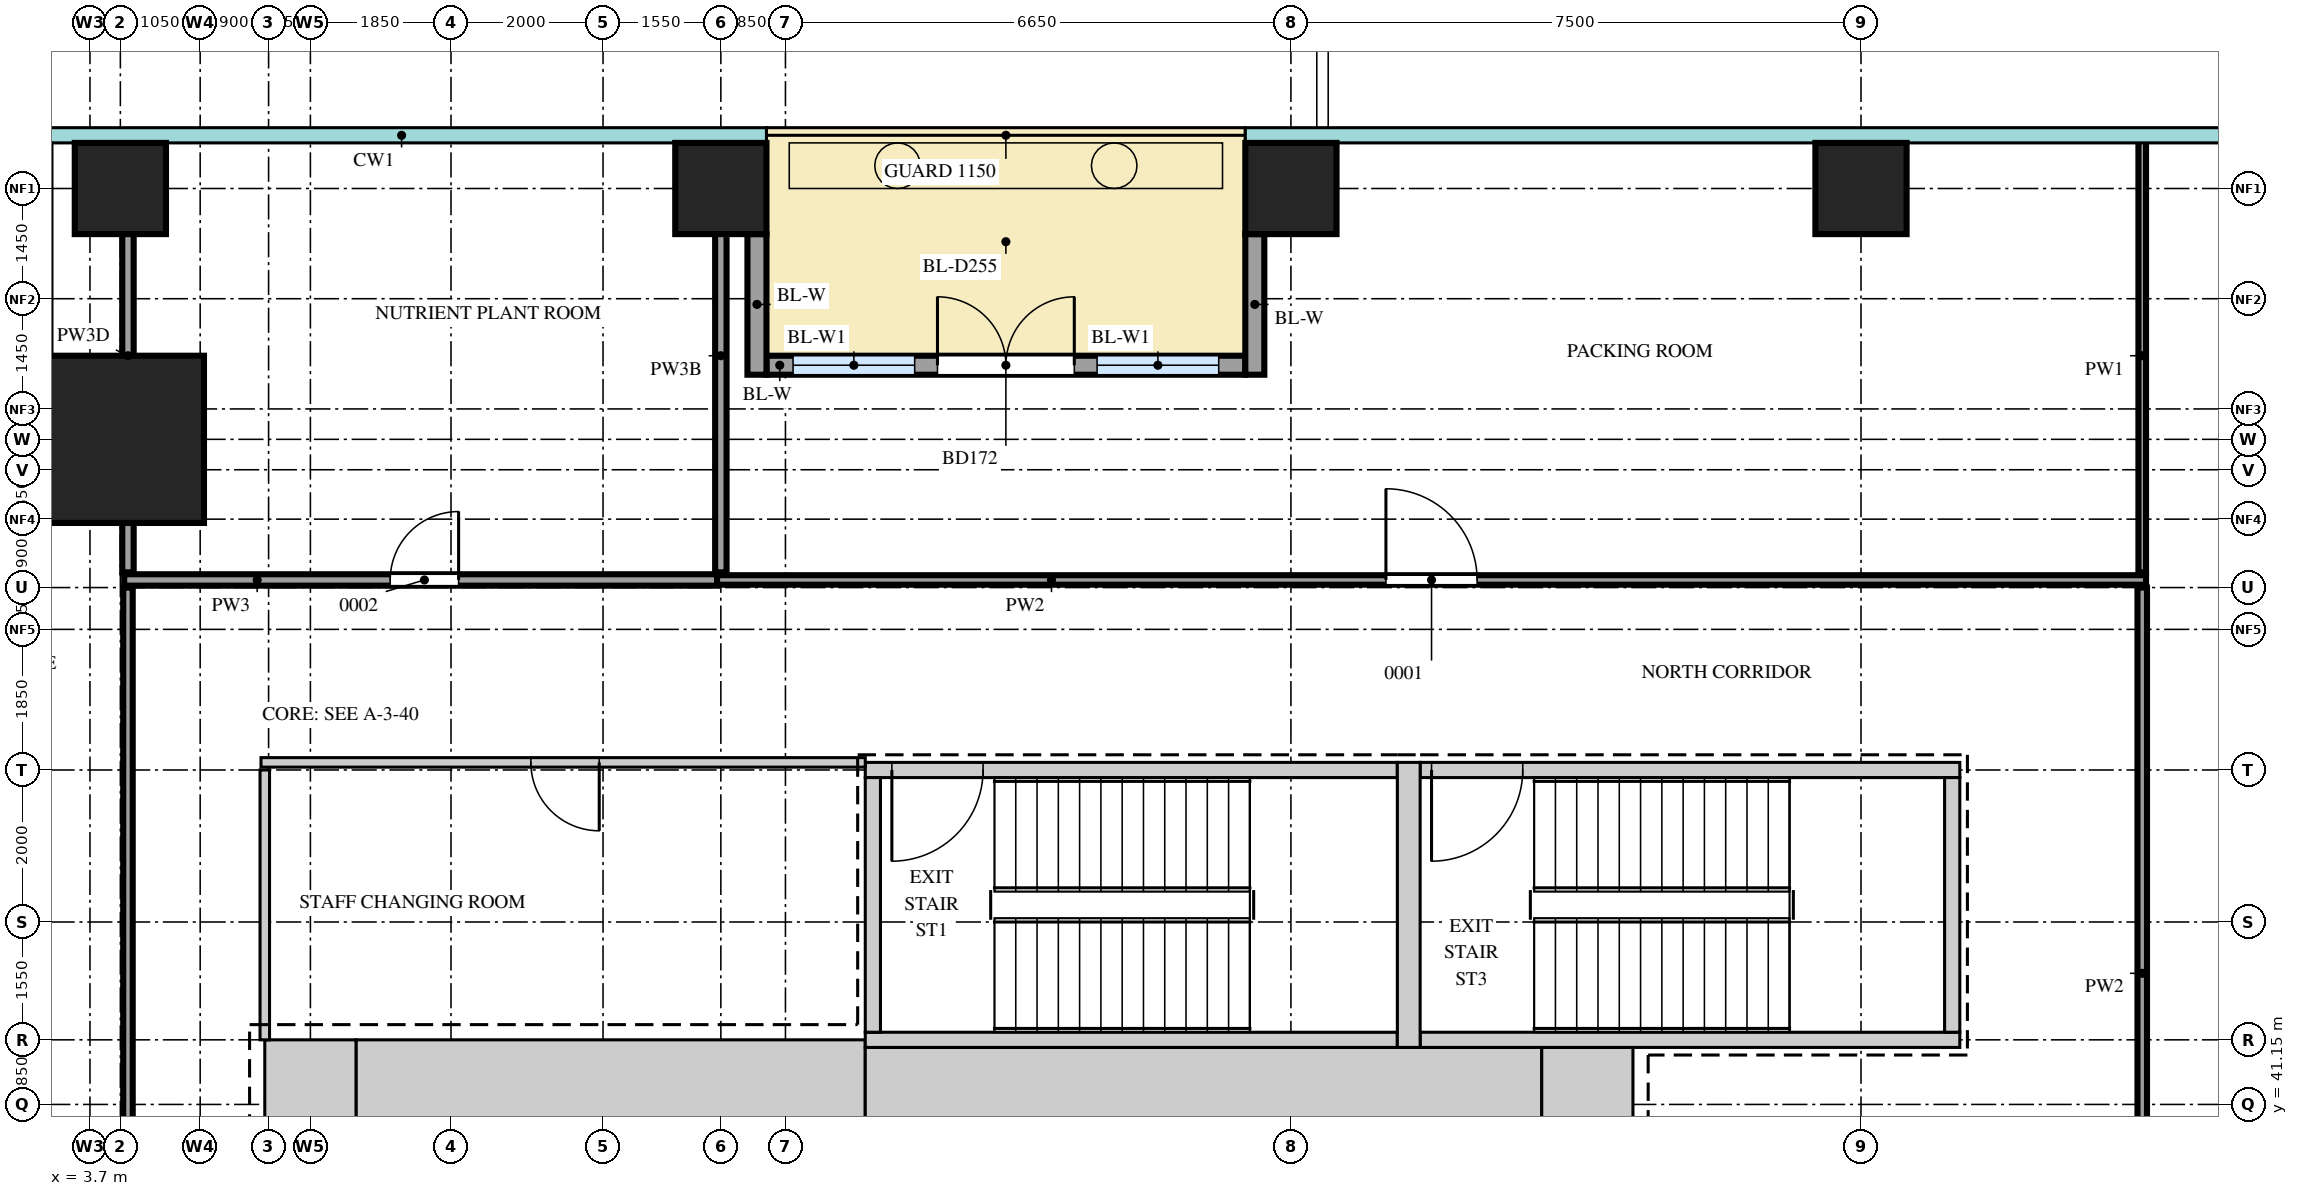
"""IFC4 building model, lengths in metres.
Left out: names, types, materials, properties, quantities, classifications, styles, units other than length and angle.
Written with IfcOpenShell. Run it as: python <this file> out.ifc"""

import sys

from ifc_helpers import new_model, si_unit, direction, frame, frame_2d, origin, origin_2d, place, context, subcontext, project, spatial, rectangle, extrude, source, transform, mapped, element, fill, save


model = new_model("IFC4")
c1 = context("Model", 3, precision=1e-05, world=origin(), true_north=direction((0.0, 1.0)))
c2 = subcontext(c1, "Body", "Model", "MODEL_VIEW")
j1 = project(units=[si_unit("LENGTHUNIT", "METRE"), si_unit("PLANEANGLEUNIT", "RADIAN")], contexts=[c1])
p1 = place(None, origin())
s1 = spatial("IfcSite", under=j1, at=p1, CompositionType="ELEMENT")
p2 = place(p1, origin())
s2 = spatial("IfcBuilding", under=s1, at=p2, CompositionType="ELEMENT")
p3 = place(p2, frame((0.0, 0.0, 82.5)))
s3 = spatial("IfcBuildingStorey", under=s2, at=p3, CompositionType="ELEMENT", Elevation=82.5)
m1 = source(origin(), c2, "Body", "SweptSolid", [
    extrude(rectangle(XDim=6.7, YDim=1.2, at=frame_2d((3.35, 0.0))), origin(), (0.0, 0.0, 1.0), 4.2),
])
p4 = place(p3, frame((7.2, 41.4, 0.0), z_axis=(0.0, 0.0, 1.0), x_axis=(1.0, 0.0, 0.0)))
e1 = element("IfcWall", 1, at=p4, inside=s3, PredefinedType="SHEAR", context=c2, shape_type="MappedRepresentation", body=[
    mapped(m1, transform((0.0, 0.0, 0.0))),
])
m2 = source(origin(), c2, "Body", "SweptSolid", [
    extrude(rectangle(XDim=8.9, YDim=1.1, at=frame_2d((4.45, 0.0))), origin(), (0.0, 0.0, 1.0), 4.2),
])
p5 = place(p3, frame((13.9, 41.35, 0.0), z_axis=(0.0, 0.0, 1.0), x_axis=(1.0, 0.0, 0.0)))
e2 = element("IfcWall", 2, at=p5, inside=s3, PredefinedType="SHEAR", context=c2, shape_type="MappedRepresentation", body=[
    mapped(m2, transform((0.0, 0.0, 0.0))),
])
m3 = source(origin(), c2, "Body", "SweptSolid", [
    extrude(rectangle(XDim=1.2, YDim=1.1, at=frame_2d((0.6, 0.0))), origin(), (0.0, 0.0, 1.0), 4.2),
])
p6 = place(p3, frame((22.8, 41.35, 0.0), z_axis=(0.0, 0.0, 1.0), x_axis=(1.0, 0.0, 0.0)))
e3 = element("IfcWall", 3, at=p6, inside=s3, PredefinedType="SHEAR", context=c2, shape_type="MappedRepresentation", body=[
    mapped(m3, transform((0.0, 0.0, 0.0))),
])
m4 = source(origin(), c2, "Body", "SweptSolid", [
    extrude(rectangle(XDim=1.2, YDim=1.2, at=frame_2d((0.6, 0.0))), origin(), (0.0, 0.0, 1.0), 4.2),
])
p7 = place(p3, frame((6.0, 41.4, 0.0), z_axis=(0.0, 0.0, 1.0), x_axis=(1.0, 0.0, 0.0)))
e4 = element("IfcWall", 4, at=p7, inside=s3, PredefinedType="SHEAR", context=c2, shape_type="MappedRepresentation", body=[
    mapped(m4, transform((0.0, 0.0, 0.0))),
])
m5 = source(origin(), c2, "Body", "SweptSolid", [
    extrude(rectangle(XDim=7.0, YDim=0.2, at=frame_2d((3.5, 0.0))), origin(), (0.0, 0.0, 1.0), 4.2),
])
p8 = place(p3, frame((13.9, 45.55, 0.0), z_axis=(0.0, 0.0, 1.0), x_axis=(1.0, 0.0, 0.0)))
e5 = element("IfcWall", 5, at=p8, inside=s3, PredefinedType="SHEAR", context=c2, shape_type="MappedRepresentation", body=[
    mapped(m5, transform((0.0, 0.0, 0.0))),
])
m6 = source(origin(), c2, "Body", "SweptSolid", [
    extrude(rectangle(XDim=1.2, YDim=2.1, at=frame_2d((0.6, 1.05))), frame((0.0, 0.11, 0.0), z_axis=(0.0, -1.0, 0.0), x_axis=(1.0, 0.0, 0.0)), (0.0, 0.0, 1.0), 0.22),
])
p9 = place(p8, frame((0.35, 0.0, 0.0)))
e6 = element("IfcOpeningElement", 6, at=p9, cuts=e5, PredefinedType="OPENING", context=c2, shape_type="MappedRepresentation", body=[
    mapped(m6, transform((0.0, 0.0, 0.0))),
])
p10 = place(p3, frame((13.9, 42.0, 0.0), z_axis=(0.0, 0.0, 1.0), x_axis=(1.0, 0.0, 0.0)))
e7 = element("IfcWall", 7, at=p10, inside=s3, PredefinedType="SHEAR", context=c2, shape_type="MappedRepresentation", body=[
    mapped(m5, transform((0.0, 0.0, 0.0))),
])
m7 = source(origin(), c2, "Body", "SweptSolid", [
    extrude(rectangle(XDim=7.1, YDim=0.2, at=frame_2d((3.55, 0.0))), origin(), (0.0, 0.0, 1.0), 4.2),
])
p11 = place(p3, frame((21.2, 45.55, 0.0), z_axis=(0.0, 0.0, 1.0), x_axis=(1.0, 0.0, 0.0)))
e8 = element("IfcWall", 8, at=p11, inside=s3, PredefinedType="SHEAR", context=c2, shape_type="MappedRepresentation", body=[
    mapped(m7, transform((0.0, 0.0, 0.0))),
])
p12 = place(p11, frame((0.15, 0.0, 0.0)))
e9 = element("IfcOpeningElement", 9, at=p12, cuts=e8, PredefinedType="OPENING", context=c2, shape_type="MappedRepresentation", body=[
    mapped(m6, transform((0.0, 0.0, 0.0))),
])
p13 = place(p3, frame((21.2, 42.0, 0.0), z_axis=(0.0, 0.0, 1.0), x_axis=(1.0, 0.0, 0.0)))
e10 = element("IfcWall", 10, at=p13, inside=s3, PredefinedType="SHEAR", context=c2, shape_type="MappedRepresentation", body=[
    mapped(m7, transform((0.0, 0.0, 0.0))),
])
m8 = source(origin(), c2, "Body", "SweptSolid", [
    extrude(rectangle(XDim=3.75, YDim=0.3, at=frame_2d((1.875, 0.0))), origin(), (0.0, 0.0, 1.0), 4.2),
])
p14 = place(p3, frame((21.05, 41.9, 0.0), z_axis=(0.0, 0.0, 1.0), x_axis=(0.0, 1.0, 0.0)))
e11 = element("IfcWall", 11, at=p14, inside=s3, PredefinedType="SHEAR", context=c2, shape_type="MappedRepresentation", body=[
    mapped(m8, transform((0.0, 0.0, 0.0))),
])
m9 = source(origin(), c2, "Body", "SweptSolid", [
    extrude(rectangle(XDim=3.35, YDim=0.2, at=frame_2d((1.675, 0.0))), origin(), (0.0, 0.0, 1.0), 4.2),
])
for number, where, z_axis, x_axis in (
    (12, (14.0, 42.1, 0.0), (0.0, 0.0, 1.0), (0.0, 1.0, 0.0)),
    (13, (28.2, 42.1, 0.0), (0.0, 0.0, 1.0), (0.0, 1.0, 0.0)),
):
    element("IfcWall", number, at=place(p3, frame(where, z_axis=z_axis, x_axis=x_axis)), inside=s3, PredefinedType="SHEAR", context=c2, shape_type="MappedRepresentation", body=[
        mapped(m9, transform((0.0, 0.0, 0.0))),
    ])
m10 = source(origin(), c2, "Body", "SweptSolid", [
    extrude(rectangle(XDim=2.2, YDim=2.2, at=origin_2d()), origin(), (0.0, 0.0, 1.0), 4.5),
])
p15 = place(p3, frame((4.1, 49.9, 0.0), z_axis=(0.0, 0.0, 1.0), x_axis=(1.0, 0.0, 0.0)))
e14 = element("IfcColumn", 14, at=p15, inside=s3, PredefinedType="COLUMN", context=c2, shape_type="MappedRepresentation", body=[
    mapped(m10, transform((0.0, 0.0, 0.0))),
])
m11 = source(origin(), c2, "Body", "SweptSolid", [
    extrude(rectangle(XDim=1.2, YDim=1.2, at=origin_2d()), origin(), (0.0, 0.0, 1.0), 4.2),
])
for number, where, z_axis, x_axis in (
    (15, (4.1, 53.2, 0.0), (0.0, 0.0, 1.0), (1.0, 0.0, 0.0)),
    (16, (12.0, 53.2, 0.0), (0.0, 0.0, 1.0), (1.0, 0.0, 0.0)),
    (17, (19.5, 53.2, 0.0), (0.0, 0.0, 1.0), (1.0, 0.0, 0.0)),
    (18, (27.0, 53.2, 0.0), (0.0, 0.0, 1.0), (1.0, 0.0, 0.0)),
):
    element("IfcColumn", number, at=place(p3, frame(where, z_axis=z_axis, x_axis=x_axis)), inside=s3, PredefinedType="COLUMN", context=c2, shape_type="MappedRepresentation", body=[
        mapped(m11, transform((0.0, 0.0, 0.0))),
    ])
m12 = source(origin(), c2, "Body", "SweptSolid", [
    extrude(rectangle(XDim=6.3, YDim=0.25, at=frame_2d((3.15, 0.0))), origin(), (0.0, 0.0, 1.0), 4.2),
])
p16 = place(p3, frame((12.6, 50.875, 0.0), z_axis=(0.0, 0.0, 1.0), x_axis=(1.0, 0.0, 0.0)))
e19 = element("IfcWall", 19, at=p16, inside=s3, PredefinedType="SOLIDWALL", context=c2, shape_type="MappedRepresentation", body=[
    mapped(m12, transform((0.0, 0.0, 0.0))),
])
m13 = source(origin(), c2, "Body", "SweptSolid", [
    extrude(rectangle(XDim=1.6, YDim=2.4, at=frame_2d((0.8, 1.2))), frame((0.0, 0.135, 0.0), z_axis=(0.0, -1.0, 0.0), x_axis=(1.0, 0.0, 0.0)), (0.0, 0.0, 1.0), 0.27),
])
p17 = place(p16, frame((0.35, 0.0, 0.0)))
e20 = element("IfcOpeningElement", 20, at=p17, cuts=e19, PredefinedType="OPENING", context=c2, shape_type="MappedRepresentation", body=[
    mapped(m13, transform((0.0, 0.0, 0.0))),
])
p18 = place(p16, frame((4.35, 0.0, 0.0)))
e21 = element("IfcOpeningElement", 21, at=p18, cuts=e19, PredefinedType="OPENING", context=c2, shape_type="MappedRepresentation", body=[
    mapped(m13, transform((0.0, 0.0, 0.0))),
])
m14 = source(origin(), c2, "Body", "SweptSolid", [
    extrude(rectangle(XDim=1.8, YDim=2.4, at=frame_2d((0.9, 1.2))), frame((0.0, 0.135, 0.0), z_axis=(0.0, -1.0, 0.0), x_axis=(1.0, 0.0, 0.0)), (0.0, 0.0, 1.0), 0.27),
])
p19 = place(p16, frame((2.25, 0.0, 0.0)))
e22 = element("IfcOpeningElement", 22, at=p19, cuts=e19, PredefinedType="OPENING", context=c2, shape_type="MappedRepresentation", body=[
    mapped(m14, transform((0.0, 0.0, 0.0))),
])
m15 = source(origin(), c2, "Body", "SweptSolid", [
    extrude(rectangle(XDim=1.85, YDim=0.25, at=frame_2d((0.925, 0.0))), origin(), (0.0, 0.0, 1.0), 4.2),
])
for number, where, z_axis, x_axis in (
    (23, (12.475, 52.6, 0.0), (0.0, 0.0, 1.0), (0.0, -1.0, 0.0)),
    (24, (19.025, 52.6, 0.0), (0.0, 0.0, 1.0), (0.0, -1.0, 0.0)),
):
    element("IfcWall", number, at=place(p3, frame(where, z_axis=z_axis, x_axis=x_axis)), inside=s3, PredefinedType="SOLIDWALL", context=c2, shape_type="MappedRepresentation", body=[
        mapped(m15, transform((0.0, 0.0, 0.0))),
    ])
m16 = source(origin(), c2, "Body", "SweptSolid", [
    extrude(rectangle(XDim=41.8, YDim=0.125, at=frame_2d((20.9, 0.0))), origin(), (0.0, 0.0, 1.0), 4.3),
])
p20 = place(p3, frame((4.2, 6.15, 0.0), z_axis=(0.0, 0.0, 1.0), x_axis=(0.0, 1.0, 0.0)))
e25 = element("IfcWall", 25, at=p20, inside=s3, PredefinedType="PARTITIONING", context=c2, shape_type="MappedRepresentation", body=[
    mapped(m16, transform((0.0, 0.0, 0.0))),
])
m17 = source(origin(), c2, "Body", "SweptSolid", [
    extrude(rectangle(XDim=1.2, YDim=2.1, at=frame_2d((0.6, 1.05))), frame((0.0, 0.073, 0.0), z_axis=(0.0, -1.0, 0.0), x_axis=(1.0, 0.0, 0.0)), (0.0, 0.0, 1.0), 0.145),
])
p21 = place(p20, frame((3.45, 0.0, 0.0)))
e26 = element("IfcOpeningElement", 26, at=p21, cuts=e25, PredefinedType="OPENING", context=c2, shape_type="MappedRepresentation", body=[
    mapped(m17, transform((0.0, 0.0, 0.0))),
])
m18 = source(origin(), c2, "Body", "SweptSolid", [
    extrude(rectangle(XDim=0.9, YDim=2.1, at=frame_2d((0.45, 1.05))), frame((0.0, 0.073, 0.0), z_axis=(0.0, -1.0, 0.0), x_axis=(1.0, 0.0, 0.0)), (0.0, 0.0, 1.0), 0.145),
])
p22 = place(p20, frame((13.25, 0.0, 0.0)))
e27 = element("IfcOpeningElement", 27, at=p22, cuts=e25, PredefinedType="OPENING", context=c2, shape_type="MappedRepresentation", body=[
    mapped(m18, transform((0.0, 0.0, 0.0))),
])
p23 = place(p20, frame((30.35, 0.0, 0.0)))
e28 = element("IfcOpeningElement", 28, at=p23, cuts=e25, PredefinedType="OPENING", context=c2, shape_type="MappedRepresentation", body=[
    mapped(m18, transform((0.0, 0.0, 0.0))),
])
m19 = source(origin(), c2, "Body", "SweptSolid", [
    extrude(rectangle(XDim=10.15, YDim=0.125, at=frame_2d((5.075, 0.0))), origin(), (0.0, 0.0, 1.0), 4.3),
])
p24 = place(p3, frame((30.7, 37.8, 0.0), z_axis=(0.0, 0.0, 1.0), x_axis=(0.0, 1.0, 0.0)))
e29 = element("IfcWall", 29, at=p24, inside=s3, PredefinedType="PARTITIONING", context=c2, shape_type="MappedRepresentation", body=[
    mapped(m19, transform((0.0, 0.0, 0.0))),
])
m20 = source(origin(), c2, "Body", "SweptSolid", [
    extrude(rectangle(XDim=3.55, YDim=0.125, at=frame_2d((1.775, 0.0))), origin(), (0.0, 0.0, 1.0), 4.3),
])
p25 = place(p3, frame((6.0, 42.0, 0.0), z_axis=(0.0, 0.0, 1.0), x_axis=(0.0, 1.0, 0.0)))
e30 = element("IfcWall", 30, at=p25, inside=s3, PredefinedType="PARTITIONING", context=c2, shape_type="MappedRepresentation", body=[
    mapped(m20, transform((0.0, 0.0, 0.0))),
])
m21 = source(origin(), c2, "Body", "SweptSolid", [
    extrude(rectangle(XDim=7.95, YDim=0.125, at=frame_2d((3.975, 0.0))), origin(), (0.0, 0.0, 1.0), 4.3),
])
p26 = place(p3, frame((5.95, 45.65, 0.0), z_axis=(0.0, 0.0, 1.0), x_axis=(1.0, 0.0, 0.0)))
e31 = element("IfcWall", 31, at=p26, inside=s3, PredefinedType="PARTITIONING", context=c2, shape_type="MappedRepresentation", body=[
    mapped(m21, transform((0.0, 0.0, 0.0))),
])
p27 = place(p26, frame((3.55, 0.0, 0.0)))
e32 = element("IfcOpeningElement", 32, at=p27, cuts=e31, PredefinedType="OPENING", context=c2, shape_type="MappedRepresentation", body=[
    mapped(m18, transform((0.0, 0.0, 0.0))),
])
m22 = source(origin(), c2, "Body", "SweptSolid", [
    extrude(rectangle(XDim=7.8, YDim=0.15, at=frame_2d((3.9, 0.0))), origin(), (0.0, 0.0, 1.0), 4.3),
])
p28 = place(p3, frame((4.15, 48.05, 0.0), z_axis=(0.0, 0.0, 1.0), x_axis=(1.0, 0.0, 0.0)))
e33 = element("IfcWall", 33, at=p28, inside=s3, PredefinedType="PARTITIONING", context=c2, shape_type="MappedRepresentation", body=[
    mapped(m22, transform((0.0, 0.0, 0.0))),
])
m23 = source(origin(), c2, "Body", "SweptSolid", [
    extrude(rectangle(XDim=0.9, YDim=2.1, at=frame_2d((0.45, 1.05))), frame((0.0, 0.085, 0.0), z_axis=(0.0, -1.0, 0.0), x_axis=(1.0, 0.0, 0.0)), (0.0, 0.0, 1.0), 0.17),
])
p29 = place(p28, frame((3.5, 0.0, 0.0)))
e34 = element("IfcOpeningElement", 34, at=p29, cuts=e33, PredefinedType="OPENING", context=c2, shape_type="MappedRepresentation", body=[
    mapped(m23, transform((0.0, 0.0, 0.0))),
])
m24 = source(origin(), c2, "Body", "SweptSolid", [
    extrude(rectangle(XDim=18.8, YDim=0.125, at=frame_2d((9.4, 0.0))), origin(), (0.0, 0.0, 1.0), 4.3),
])
p30 = place(p3, frame((11.95, 48.05, 0.0), z_axis=(0.0, 0.0, 1.0), x_axis=(1.0, 0.0, 0.0)))
e35 = element("IfcWall", 35, at=p30, inside=s3, PredefinedType="PARTITIONING", context=c2, shape_type="MappedRepresentation", body=[
    mapped(m24, transform((0.0, 0.0, 0.0))),
])
p31 = place(p30, frame((8.8, 0.0, 0.0)))
e36 = element("IfcOpeningElement", 36, at=p31, cuts=e35, PredefinedType="OPENING", context=c2, shape_type="MappedRepresentation", body=[
    mapped(m17, transform((0.0, 0.0, 0.0))),
])
m25 = source(origin(), c2, "Body", "SweptSolid", [
    extrude(rectangle(XDim=5.7, YDim=0.15, at=frame_2d((2.85, 0.0))), origin(), (0.0, 0.0, 1.0), 3.6),
])
p32 = place(p3, frame((4.2, 48.15, 0.0), z_axis=(0.0, 0.0, 1.0), x_axis=(0.0, 1.0, 0.0)))
e37 = element("IfcWall", 37, at=p32, inside=s3, PredefinedType="PARTITIONING", context=c2, shape_type="MappedRepresentation", body=[
    mapped(m25, transform((0.0, 0.0, 0.0))),
])
m26 = source(origin(), c2, "Body", "SweptSolid", [
    extrude(rectangle(XDim=5.7, YDim=0.15, at=frame_2d((2.85, 0.0))), origin(), (0.0, 0.0, 1.0), 3.7),
])
p33 = place(p3, frame((12.0, 48.15, 0.0), z_axis=(0.0, 0.0, 1.0), x_axis=(0.0, 1.0, 0.0)))
e38 = element("IfcWall", 38, at=p33, inside=s3, PredefinedType="PARTITIONING", context=c2, shape_type="MappedRepresentation", body=[
    mapped(m26, transform((0.0, 0.0, 0.0))),
])
m27 = source(origin(), c2, "Body", "SweptSolid", [
    extrude(rectangle(XDim=5.7, YDim=0.1, at=frame_2d((2.85, 0.0))), origin(), (0.0, 0.0, 1.0), 4.3),
])
p34 = place(p3, frame((30.7, 48.15, 0.0), z_axis=(0.0, 0.0, 1.0), x_axis=(0.0, 1.0, 0.0)))
e39 = element("IfcWall", 39, at=p34, inside=s3, PredefinedType="PARTITIONING", context=c2, shape_type="MappedRepresentation", body=[
    mapped(m27, transform((0.0, 0.0, 0.0))),
])
m28 = source(origin(), c2, "Body", "SweptSolid", [
    extrude(rectangle(XDim=1.6, YDim=2.4, at=frame_2d((0.8, 1.2))), frame((0.0, 0.03, 0.0), z_axis=(0.0, -1.0, 0.0), x_axis=(1.0, 0.0, 0.0)), (0.0, 0.0, 1.0), 0.06),
])
p35 = place(p17, origin())
e40 = element("IfcWindow", 40, at=p35, inside=s3, PartitioningType="SINGLE_PANEL", PredefinedType="WINDOW", context=c2, shape_type="MappedRepresentation", body=[
    mapped(m28, transform((0.0, 0.0, 0.0))),
])
fill(e20, e40)
p36 = place(p18, origin())
e41 = element("IfcWindow", 41, at=p36, inside=s3, PartitioningType="SINGLE_PANEL", PredefinedType="WINDOW", context=c2, shape_type="MappedRepresentation", body=[
    mapped(m28, transform((0.0, 0.0, 0.0))),
])
fill(e21, e41)
m29 = source(origin(), c2, "Body", "SweptSolid", [
    extrude(rectangle(XDim=1.8, YDim=2.4, at=frame_2d((0.9, 1.2))), frame((0.0, 0.025, 0.0), z_axis=(0.0, -1.0, 0.0), x_axis=(1.0, 0.0, 0.0)), (0.0, 0.0, 1.0), 0.05),
])
p37 = place(p19, origin())
e42 = element("IfcDoor", 42, at=p37, inside=s3, OperationType="DOUBLE_DOOR_DOUBLE_SWING", PredefinedType="DOOR", context=c2, shape_type="MappedRepresentation", body=[
    mapped(m29, transform((0.0, 0.0, 0.0))),
])
fill(e22, e42)
m30 = source(origin(), c2, "Body", "SweptSolid", [
    extrude(rectangle(XDim=0.9, YDim=2.1, at=frame_2d((0.45, 1.05))), frame((0.0, 0.025, 0.0), z_axis=(0.0, -1.0, 0.0), x_axis=(1.0, 0.0, 0.0)), (0.0, 0.0, 1.0), 0.05),
])
p38 = place(p29, origin())
e43 = element("IfcDoor", 43, at=p38, inside=s3, OperationType="SINGLE_SWING_LEFT", PredefinedType="DOOR", context=c2, shape_type="MappedRepresentation", body=[
    mapped(m30, transform((0.0, 0.0, 0.0))),
])
fill(e34, e43)
m31 = source(origin(), c2, "Body", "SweptSolid", [
    extrude(rectangle(XDim=1.2, YDim=2.1, at=frame_2d((0.6, 1.05))), frame((0.0, 0.025, 0.0), z_axis=(0.0, -1.0, 0.0), x_axis=(1.0, 0.0, 0.0)), (0.0, 0.0, 1.0), 0.05),
])
p39 = place(p31, origin())
e44 = element("IfcDoor", 44, at=p39, inside=s3, OperationType="SINGLE_SWING_RIGHT", PredefinedType="DOOR", context=c2, shape_type="MappedRepresentation", body=[
    mapped(m31, transform((0.0, 0.0, 0.0))),
])
fill(e36, e44)
p40 = place(p27, origin())
e45 = element("IfcDoor", 45, at=p40, inside=s3, OperationType="SINGLE_SWING_RIGHT", PredefinedType="DOOR", context=c2, shape_type="MappedRepresentation", body=[
    mapped(m30, transform((0.0, 0.0, 0.0))),
])
fill(e32, e45)
p41 = place(p9, origin())
e46 = element("IfcDoor", 46, at=p41, inside=s3, OperationType="SINGLE_SWING_LEFT", PredefinedType="DOOR", context=c2, shape_type="MappedRepresentation", body=[
    mapped(m31, transform((0.0, 0.0, 0.0))),
])
fill(e6, e46)
p42 = place(p12, origin())
e47 = element("IfcDoor", 47, at=p42, inside=s3, OperationType="SINGLE_SWING_LEFT", PredefinedType="DOOR", context=c2, shape_type="MappedRepresentation", body=[
    mapped(m31, transform((0.0, 0.0, 0.0))),
])
fill(e9, e47)
save(model, sys.argv[1])
